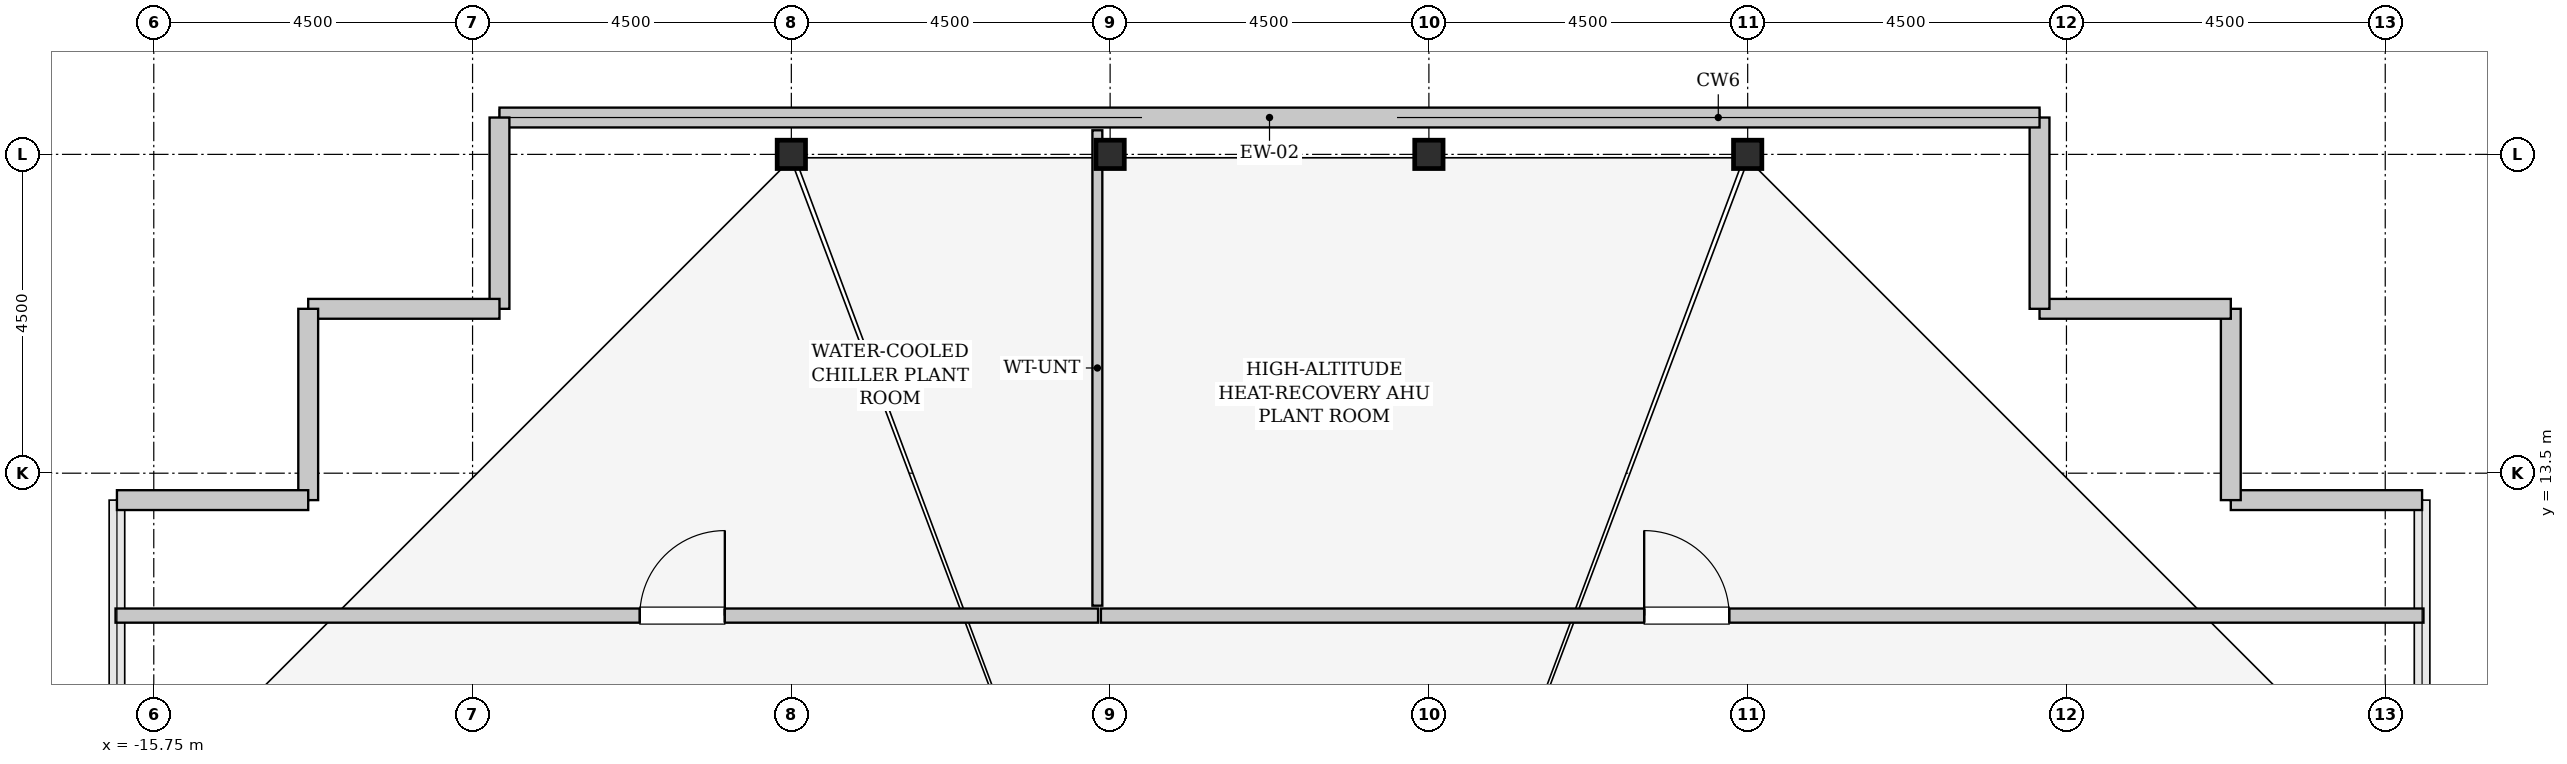
"""IFC4 building model, lengths in metres.
Left out: names, types, materials, properties, quantities, classifications, styles, units other than length and angle.
Written with IfcOpenShell. Run it as: python <this file> out.ifc"""

import sys

from ifc_helpers import new_model, si_unit, direction, frame, frame_2d, origin, origin_2d, place, context, subcontext, project, spatial, rectangle, hollow_rectangle, extrude, source, transform, mapped, element, fill, save


model = new_model("IFC4")
c1 = context("Model", 3, precision=1e-05, world=origin(), true_north=direction((0.0, 1.0)))
c2 = subcontext(c1, "Body", "Model", "MODEL_VIEW")
j1 = project(units=[si_unit("LENGTHUNIT", "METRE"), si_unit("PLANEANGLEUNIT", "RADIAN")], contexts=[c1])
p1 = place(None, origin())
s1 = spatial("IfcSite", under=j1, at=p1, CompositionType="ELEMENT")
p2 = place(p1, origin())
s2 = spatial("IfcBuilding", under=s1, at=p2, CompositionType="ELEMENT")
p3 = place(p2, frame((0.0, 0.0, 367.4)))
s3 = spatial("IfcBuildingStorey", under=s2, at=p3, CompositionType="ELEMENT", Elevation=367.4)
m1 = source(origin(), c2, "Body", "SweptSolid", [
    extrude(hollow_rectangle(XDim=0.4, YDim=0.4, WallThickness=0.02, InnerFilletRadius=0.02, OuterFilletRadius=0.04, at=origin_2d()), origin(), (0.0, 0.0, 1.0), 4.4),
])
for number, where, z_axis, x_axis in (
    (1, (-6.75, 18.0, 0.0), (0.0, 0.0, 1.0), (1.0, 0.0, 0.0)),
    (2, (-2.25, 18.0, 0.0), (0.0, 0.0, 1.0), (1.0, 0.0, 0.0)),
    (3, (2.25, 18.0, 0.0), (0.0, 0.0, 1.0), (1.0, 0.0, 0.0)),
    (4, (6.75, 18.0, 0.0), (0.0, 0.0, 1.0), (1.0, 0.0, 0.0)),
):
    element("IfcColumn", number, at=place(p3, frame(where, z_axis=z_axis, x_axis=x_axis)), inside=s3, PredefinedType="COLUMN", context=c2, shape_type="MappedRepresentation", body=[
        mapped(m1, transform((0.0, 0.0, 0.0), x_axis=(1.0, 0.0, 0.0), y_axis=(0.0, 1.0, 0.0), z_axis=(0.0, 0.0, 1.0), scale=1.0)),
    ])
m2 = source(origin(), c2, "Body", "SweptSolid", [
    extrude(rectangle(XDim=2.7, YDim=0.28, at=frame_2d((1.35, 0.0))), origin(), (0.0, 0.0, 1.0), 4.1),
])
for number, where, z_axis, x_axis in (
    (5, (16.27, 13.12, 0.0), (0.0, 0.0, 1.0), (-1.0, 0.0, 0.0)),
    (6, (13.57, 13.12, 0.0), (0.0, 0.0, 1.0), (0.0, 1.0, 0.0)),
    (7, (13.57, 15.82, 0.0), (0.0, 0.0, 1.0), (-1.0, 0.0, 0.0)),
    (8, (10.87, 15.82, 0.0), (0.0, 0.0, 1.0), (0.0, 1.0, 0.0)),
):
    element("IfcWall", number, at=place(p3, frame(where, z_axis=z_axis, x_axis=x_axis)), inside=s3, PredefinedType="SOLIDWALL", context=c2, shape_type="MappedRepresentation", body=[
        mapped(m2, transform((0.0, 0.0, 0.0), x_axis=(1.0, 0.0, 0.0), y_axis=(0.0, 1.0, 0.0), z_axis=(0.0, 0.0, 1.0), scale=1.0)),
    ])
m3 = source(origin(), c2, "Body", "SweptSolid", [
    extrude(rectangle(XDim=21.74, YDim=0.28, at=frame_2d((10.87, 0.0))), origin(), (0.0, 0.0, 1.0), 1.1),
])
p4 = place(p3, frame((10.87, 18.52, 0.0), z_axis=(0.0, 0.0, 1.0), x_axis=(-1.0, 0.0, 0.0)))
e9 = element("IfcWall", 9, at=p4, inside=s3, PredefinedType="SOLIDWALL", context=c2, shape_type="MappedRepresentation", body=[
    mapped(m3, transform((0.0, 0.0, 0.0), x_axis=(1.0, 0.0, 0.0), y_axis=(0.0, 1.0, 0.0), z_axis=(0.0, 0.0, 1.0), scale=1.0)),
])
for number, where, z_axis, x_axis in (
    (10, (-10.87, 18.52, 0.0), (0.0, 0.0, 1.0), (0.0, -1.0, 0.0)),
    (11, (-10.87, 15.82, 0.0), (0.0, 0.0, 1.0), (-1.0, 0.0, 0.0)),
    (12, (-13.57, 15.82, 0.0), (0.0, 0.0, 1.0), (0.0, -1.0, 0.0)),
    (13, (-13.57, 13.12, 0.0), (0.0, 0.0, 1.0), (-1.0, 0.0, 0.0)),
):
    element("IfcWall", number, at=place(p3, frame(where, z_axis=z_axis, x_axis=x_axis)), inside=s3, PredefinedType="SOLIDWALL", context=c2, shape_type="MappedRepresentation", body=[
        mapped(m2, transform((0.0, 0.0, 0.0), x_axis=(1.0, 0.0, 0.0), y_axis=(0.0, 1.0, 0.0), z_axis=(0.0, 0.0, 1.0), scale=1.0)),
    ])
m4 = source(origin(), c2, "Body", "SweptSolid", [
    extrude(rectangle(XDim=13.87, YDim=0.2, at=frame_2d((6.935, 0.0))), origin(), (0.0, 0.0, 1.0), 4.085),
])
p5 = place(p3, frame((-16.29, 11.49, 0.0), z_axis=(0.0, 0.0, 1.0), x_axis=(1.0, 0.0, 0.0)))
e14 = element("IfcWall", 14, at=p5, inside=s3, PredefinedType="SOLIDWALL", context=c2, shape_type="MappedRepresentation", body=[
    mapped(m4, transform((0.0, 0.0, 0.0), x_axis=(1.0, 0.0, 0.0), y_axis=(0.0, 1.0, 0.0), z_axis=(0.0, 0.0, 1.0), scale=1.0)),
])
p6 = place(p5, frame((7.401, 0.0, 0.0)))
e15 = element("IfcOpeningElement", 15, at=p6, cuts=e14, PredefinedType="OPENING", context=c2, shape_type="SweptSolid", body=[
    extrude(rectangle(XDim=1.2, YDim=2.15, at=frame_2d((0.6, 1.075))), frame((0.0, 0.11, 0.0), z_axis=(0.0, -1.0, 0.0), x_axis=(1.0, 0.0, 0.0)), (0.0, 0.0, 1.0), 0.22),
])
m5 = source(origin(), c2, "Body", "SweptSolid", [
    extrude(rectangle(XDim=6.71, YDim=0.14, at=frame_2d((3.355, 0.0))), origin(), (0.0, 0.0, 1.0), 4.085),
])
p7 = place(p3, frame((-2.43, 11.63, 0.0), z_axis=(0.0, 0.0, 1.0), x_axis=(0.0, 1.0, 0.0)))
e16 = element("IfcWall", 16, at=p7, inside=s3, PredefinedType="PARTITIONING", context=c2, shape_type="MappedRepresentation", body=[
    mapped(m5, transform((0.0, 0.0, 0.0), x_axis=(1.0, 0.0, 0.0), y_axis=(0.0, 1.0, 0.0), z_axis=(0.0, 0.0, 1.0), scale=1.0)),
])
m6 = source(origin(), c2, "Body", "SweptSolid", [
    extrude(rectangle(XDim=18.67, YDim=0.2, at=frame_2d((9.335, 0.0))), origin(), (0.0, 0.0, 1.0), 4.085),
])
p8 = place(p3, frame((-2.38, 11.49, 0.0), z_axis=(0.0, 0.0, 1.0), x_axis=(1.0, 0.0, 0.0)))
e17 = element("IfcWall", 17, at=p8, inside=s3, PredefinedType="SOLIDWALL", context=c2, shape_type="MappedRepresentation", body=[
    mapped(m6, transform((0.0, 0.0, 0.0), x_axis=(1.0, 0.0, 0.0), y_axis=(0.0, 1.0, 0.0), z_axis=(0.0, 0.0, 1.0), scale=1.0)),
])
p9 = place(p8, frame((7.669, 0.0, 0.0)))
e18 = element("IfcOpeningElement", 18, at=p9, cuts=e17, PredefinedType="OPENING", context=c2, shape_type="SweptSolid", body=[
    extrude(rectangle(XDim=1.2, YDim=2.15, at=frame_2d((0.6, 1.075))), frame((0.0, 0.11, 0.0), z_axis=(0.0, -1.0, 0.0), x_axis=(1.0, 0.0, 0.0)), (0.0, 0.0, 1.0), 0.22),
])
m7 = source(origin(), c2, "Body", "SweptSolid", [
    extrude(rectangle(XDim=1.2, YDim=2.15, at=frame_2d((0.6, 1.075))), frame((0.0, 0.025, 0.0), z_axis=(0.0, -1.0, 0.0), x_axis=(1.0, 0.0, 0.0)), (0.0, 0.0, 1.0), 0.05),
])
p10 = place(p6, origin())
e19 = element("IfcDoor", 19, at=p10, inside=s3, OperationType="SINGLE_SWING_RIGHT", PredefinedType="DOOR", context=c2, shape_type="MappedRepresentation", body=[
    mapped(m7, transform((0.0, 0.0, 0.0), x_axis=(1.0, 0.0, 0.0), y_axis=(0.0, 1.0, 0.0), z_axis=(0.0, 0.0, 1.0), scale=1.0)),
])
fill(e15, e19)
p11 = place(p9, origin())
e20 = element("IfcDoor", 20, at=p11, inside=s3, OperationType="SINGLE_SWING_LEFT", PredefinedType="DOOR", context=c2, shape_type="MappedRepresentation", body=[
    mapped(m7, transform((0.0, 0.0, 0.0), x_axis=(1.0, 0.0, 0.0), y_axis=(0.0, 1.0, 0.0), z_axis=(0.0, 0.0, 1.0), scale=1.0)),
])
fill(e18, e20)
save(model, sys.argv[1])
